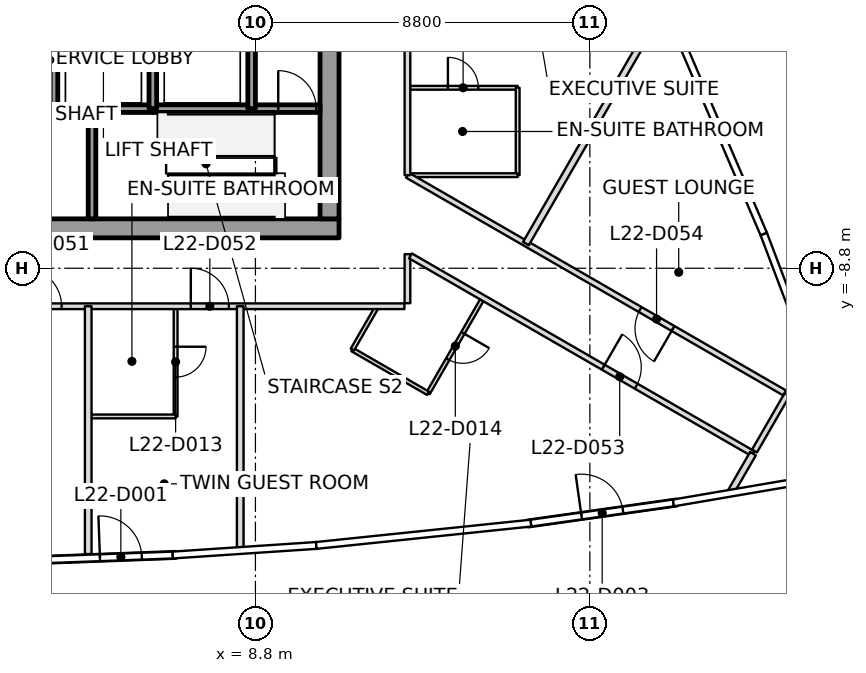
"""IFC4 building model, lengths in metres.
Left out: names, types, materials, properties, quantities, classifications, styles, units other than length and angle.
Written with IfcOpenShell. Run it as: python <this file> out.ifc"""

import sys

from ifc_helpers import new_model, si_unit, direction, frame, frame_2d, origin, place, context, subcontext, project, spatial, rectangle, extrude, element, fill, save


model = new_model("IFC4")
c1 = context("Model", 3, precision=1e-05, world=origin(), true_north=direction((0.0, 1.0)))
c2 = subcontext(c1, "Body", "Model", "MODEL_VIEW")
j1 = project(units=[si_unit("LENGTHUNIT", "METRE"), si_unit("PLANEANGLEUNIT", "RADIAN")], contexts=[c1])
p1 = place(None, origin())
s1 = spatial("IfcSite", under=j1, at=p1, CompositionType="ELEMENT")
p2 = place(p1, origin())
s2 = spatial("IfcBuilding", under=s1, at=p2, CompositionType="ELEMENT")
p3 = place(p2, frame((0.0, 0.0, 103.5)))
s3 = spatial("IfcBuildingStorey", under=s2, at=p3, CompositionType="ELEMENT", Elevation=103.5)
p4 = place(p3, frame((-11.0, -7.75, 0.0), z_axis=(0.0, 0.0, 1.0), x_axis=(1.0, 0.0, 0.0)))
e1 = element("IfcWall", 1, at=p4, inside=s3, PredefinedType="SHEAR", context=c2, shape_type="SweptSolid", body=[
    extrude(rectangle(XDim=22.0, YDim=0.5, at=frame_2d((11.0, 0.0))), origin(), (0.0, 0.0, 1.0), 3.7),
])
p5 = place(p4, frame((10.45, 0.0, 0.0)))
e2 = element("IfcOpeningElement", 2, at=p5, cuts=e1, PredefinedType="OPENING", context=c2, shape_type="SweptSolid", body=[
    extrude(rectangle(XDim=1.1, YDim=2.1, at=frame_2d((0.55, 1.05))), frame((0.0, 0.25, 0.0), z_axis=(0.0, -1.0, 0.0), x_axis=(1.0, 0.0, 0.0)), (0.0, 0.0, 1.0), 0.5),
])
p6 = place(p3, frame((10.75, -7.5, 0.0), z_axis=(0.0, 0.0, 1.0), x_axis=(0.0, 1.0, 0.0)))
e3 = element("IfcWall", 3, at=p6, inside=s3, PredefinedType="SHEAR", context=c2, shape_type="SweptSolid", body=[
    extrude(rectangle(XDim=15.0, YDim=0.5, at=frame_2d((7.5, 0.0))), origin(), (0.0, 0.0, 1.0), 3.7),
])
p7 = place(p6, frame((6.6, 0.0, 0.0)))
e4 = element("IfcOpeningElement", 4, at=p7, cuts=e3, PredefinedType="OPENING", context=c2, shape_type="SweptSolid", body=[
    extrude(rectangle(XDim=1.8, YDim=2.1, at=frame_2d((0.9, 1.05))), frame((0.0, 0.25, 0.0), z_axis=(0.0, -1.0, 0.0), x_axis=(1.0, 0.0, 0.0)), (0.0, 0.0, 1.0), 0.5),
])
p8 = place(p3, frame((2.75, -16.49, 0.0), z_axis=(0.0, 0.0, 1.0), x_axis=(0.999313230766, 0.037054916226, 0.0)))
e5 = element("IfcWall", 5, at=p8, inside=s3, PredefinedType="SOLIDWALL", context=c2, shape_type="SweptSolid", body=[
    extrude(rectangle(XDim=3.966, YDim=0.2, at=frame_2d((1.983, 0.0))), origin(), (0.0, 0.0, 1.0), 3.017),
])
p9 = place(p8, frame((1.96, 0.0, 0.0)))
e6 = element("IfcOpeningElement", 6, at=p9, cuts=e5, PredefinedType="OPENING", context=c2, shape_type="SweptSolid", body=[
    extrude(rectangle(XDim=1.1, YDim=2.1, at=frame_2d((0.55, 1.05))), frame((0.0, 0.1, 0.0), z_axis=(0.0, -1.0, 0.0), x_axis=(1.0, 0.0, 0.0)), (0.0, 0.0, 1.0), 0.2),
])
p10 = place(p3, frame((15.961, -15.52, 0.0), z_axis=(0.0, 0.0, 1.0), x_axis=(0.990119893165, 0.140223383067, 0.0)))
e7 = element("IfcWall", 7, at=p10, inside=s3, PredefinedType="SOLIDWALL", context=c2, shape_type="SweptSolid", body=[
    extrude(rectangle(XDim=3.966, YDim=0.2, at=frame_2d((1.983, 0.0))), origin(), (0.0, 0.0, 1.0), 3.04),
])
p11 = place(p10, frame((1.433, 0.0, 0.0)))
e8 = element("IfcOpeningElement", 8, at=p11, cuts=e7, PredefinedType="OPENING", context=c2, shape_type="SweptSolid", body=[
    extrude(rectangle(XDim=1.1, YDim=2.1, at=frame_2d((0.55, 1.05))), frame((0.0, 0.1, 0.0), z_axis=(0.0, -1.0, 0.0), x_axis=(1.0, 0.0, 0.0)), (0.0, 0.0, 1.0), 0.2),
])
p12 = place(p3, frame((3.5, -4.6, 0.0), z_axis=(0.0, 0.0, 1.0), x_axis=(-1.0, 0.0, 0.0)))
e9 = element("IfcWall", 9, at=p12, inside=s3, PredefinedType="SOLIDWALL", context=c2, shape_type="SweptSolid", body=[
    extrude(rectangle(XDim=2.6, YDim=0.2, at=frame_2d((1.3, 0.0))), origin(), (0.0, 0.0, 1.0), 3.55),
])
p13 = place(p3, frame((4.5, -4.6, 0.0), z_axis=(0.0, 0.0, 1.0), x_axis=(-1.0, 0.0, 0.0)))
e10 = element("IfcWall", 10, at=p13, inside=s3, PredefinedType="SOLIDWALL", context=c2, shape_type="SweptSolid", body=[
    extrude(rectangle(XDim=1.0, YDim=0.2, at=frame_2d((0.5, 0.0))), origin(), (0.0, 0.0, 1.0), 3.55),
])
p14 = place(p3, frame((3.5, -4.6, 0.0), z_axis=(0.0, 0.0, 1.0), x_axis=(0.0, 1.0, 0.0)))
e11 = element("IfcWall", 11, at=p14, inside=s3, PredefinedType="SOLIDWALL", context=c2, shape_type="SweptSolid", body=[
    extrude(rectangle(XDim=2.8, YDim=0.2, at=frame_2d((1.4, 0.0))), origin(), (0.0, 0.0, 1.0), 3.55),
])
p15 = place(p3, frame((4.5, -7.5, 0.0), z_axis=(0.0, 0.0, 1.0), x_axis=(0.0, 1.0, 0.0)))
e12 = element("IfcWall", 12, at=p15, inside=s3, PredefinedType="SOLIDWALL", context=c2, shape_type="SweptSolid", body=[
    extrude(rectangle(XDim=2.9, YDim=0.2, at=frame_2d((1.45, 0.0))), origin(), (0.0, 0.0, 1.0), 3.55),
])
p16 = place(p3, frame((4.5, -4.6, 0.0), z_axis=(0.0, 0.0, 1.0), x_axis=(1.0, 0.0, 0.0)))
e13 = element("IfcWall", 13, at=p16, inside=s3, PredefinedType="SOLIDWALL", context=c2, shape_type="SweptSolid", body=[
    extrude(rectangle(XDim=1.6, YDim=0.2, at=frame_2d((0.8, 0.0))), origin(), (0.0, 0.0, 1.0), 3.55),
])
p17 = place(p3, frame((6.1, -4.6, 0.0), z_axis=(0.0, 0.0, 1.0), x_axis=(1.0, 0.0, 0.0)))
e14 = element("IfcWall", 14, at=p17, inside=s3, PredefinedType="SOLIDWALL", context=c2, shape_type="SweptSolid", body=[
    extrude(rectangle(XDim=2.6, YDim=0.2, at=frame_2d((1.3, 0.0))), origin(), (0.0, 0.0, 1.0), 3.55),
])
p18 = place(p3, frame((6.1, -4.6, 0.0), z_axis=(0.0, 0.0, 1.0), x_axis=(0.0, 1.0, 0.0)))
e15 = element("IfcWall", 15, at=p18, inside=s3, PredefinedType="SOLIDWALL", context=c2, shape_type="SweptSolid", body=[
    extrude(rectangle(XDim=2.8, YDim=0.2, at=frame_2d((1.4, 0.0))), origin(), (0.0, 0.0, 1.0), 3.55),
])
p19 = place(p3, frame((8.7, -4.6, 0.0), z_axis=(0.0, 0.0, 1.0), x_axis=(1.0, 0.0, 0.0)))
e16 = element("IfcWall", 16, at=p19, inside=s3, PredefinedType="SOLIDWALL", context=c2, shape_type="SweptSolid", body=[
    extrude(rectangle(XDim=1.8, YDim=0.2, at=frame_2d((0.9, 0.0))), origin(), (0.0, 0.0, 1.0), 3.55),
])
p20 = place(p19, frame((0.7, 0.0, 0.0)))
e17 = element("IfcOpeningElement", 17, at=p20, cuts=e16, PredefinedType="OPENING", context=c2, shape_type="SweptSolid", body=[
    extrude(rectangle(XDim=1.0, YDim=2.1, at=frame_2d((0.5, 1.05))), frame((0.0, 0.1, 0.0), z_axis=(0.0, -1.0, 0.0), x_axis=(1.0, 0.0, 0.0)), (0.0, 0.0, 1.0), 0.2),
])
p21 = place(p3, frame((8.7, -1.8, 0.0), z_axis=(0.0, 0.0, 1.0), x_axis=(0.0, -1.0, 0.0)))
e18 = element("IfcWall", 18, at=p21, inside=s3, PredefinedType="SOLIDWALL", context=c2, shape_type="SweptSolid", body=[
    extrude(rectangle(XDim=2.8, YDim=0.2, at=frame_2d((1.4, 0.0))), origin(), (0.0, 0.0, 1.0), 3.55),
])
p22 = place(p3, frame((4.4, -9.8, 0.0), z_axis=(0.0, 0.0, 1.0), x_axis=(0.0, -1.0, 0.0)))
e19 = element("IfcWall", 19, at=p22, inside=s3, PredefinedType="PARTITIONING", context=c2, shape_type="SweptSolid", body=[
    extrude(rectangle(XDim=6.521, YDim=0.175, at=frame_2d((3.26, 0.0))), origin(), (0.0, 0.0, 1.0), 3.15),
])
p23 = place(p3, frame((8.4, -9.8, 0.0), z_axis=(0.0, 0.0, 1.0), x_axis=(0.0, -1.0, 0.0)))
e20 = element("IfcWall", 20, at=p23, inside=s3, PredefinedType="PARTITIONING", context=c2, shape_type="SweptSolid", body=[
    extrude(rectangle(XDim=6.441, YDim=0.175, at=frame_2d((3.221, 0.0))), origin(), (0.0, 0.0, 1.0), 3.15),
])
p24 = place(p3, frame((19.554, -1.853, 0.0), z_axis=(0.0, 0.0, 1.0), x_axis=(-0.500006290091, -0.866021772168, 0.0)))
e21 = element("IfcWall", 21, at=p24, inside=s3, PredefinedType="PARTITIONING", context=c2, shape_type="SweptSolid", body=[
    extrude(rectangle(XDim=7.272, YDim=0.175, at=frame_2d((3.636, 0.0))), origin(), (0.0, 0.0, 1.0), 2.947),
])
p25 = place(p3, frame((21.892, -13.679, 0.0), z_axis=(0.0, 0.0, 1.0), x_axis=(-0.499896243657, -0.866085299251, 0.0)))
e22 = element("IfcWall", 22, at=p25, inside=s3, PredefinedType="PARTITIONING", context=c2, shape_type="SweptSolid", body=[
    extrude(rectangle(XDim=1.216, YDim=0.175, at=frame_2d((0.608, 0.0))), origin(), (0.0, 0.0, 1.0), 3.15),
])
p26 = place(p3, frame((-12.72, -9.8, 0.0), z_axis=(0.0, 0.0, 1.0), x_axis=(1.0, 0.0, 0.0)))
e23 = element("IfcWall", 23, at=p26, inside=s3, PredefinedType="PARTITIONING", context=c2, shape_type="SweptSolid", body=[
    extrude(rectangle(XDim=25.44, YDim=0.15, at=frame_2d((12.72, 0.0))), origin(), (0.0, 0.0, 1.0), 3.017),
])
p27 = place(p26, frame((1.62, 0.0, 0.0)))
e24 = element("IfcOpeningElement", 24, at=p27, cuts=e23, PredefinedType="OPENING", context=c2, shape_type="SweptSolid", body=[
    extrude(rectangle(XDim=1.0, YDim=2.1, at=frame_2d((0.5, 1.05))), frame((0.0, 0.075, 0.0), z_axis=(0.0, -1.0, 0.0), x_axis=(1.0, 0.0, 0.0)), (0.0, 0.0, 1.0), 0.15),
])
p28 = place(p26, frame((7.22, 0.0, 0.0)))
e25 = element("IfcOpeningElement", 25, at=p28, cuts=e23, PredefinedType="OPENING", context=c2, shape_type="SweptSolid", body=[
    extrude(rectangle(XDim=1.0, YDim=2.1, at=frame_2d((0.5, 1.05))), frame((0.0, 0.075, 0.0), z_axis=(0.0, -1.0, 0.0), x_axis=(1.0, 0.0, 0.0)), (0.0, 0.0, 1.0), 0.15),
])
p29 = place(p26, frame((10.02, 0.0, 0.0)))
e26 = element("IfcOpeningElement", 26, at=p29, cuts=e23, PredefinedType="OPENING", context=c2, shape_type="SweptSolid", body=[
    extrude(rectangle(XDim=1.0, YDim=2.1, at=frame_2d((0.5, 1.05))), frame((0.0, 0.075, 0.0), z_axis=(0.0, -1.0, 0.0), x_axis=(1.0, 0.0, 0.0)), (0.0, 0.0, 1.0), 0.15),
])
p30 = place(p26, frame((15.42, 0.0, 0.0)))
e27 = element("IfcOpeningElement", 27, at=p30, cuts=e23, PredefinedType="OPENING", context=c2, shape_type="SweptSolid", body=[
    extrude(rectangle(XDim=1.0, YDim=2.1, at=frame_2d((0.5, 1.05))), frame((0.0, 0.075, 0.0), z_axis=(0.0, -1.0, 0.0), x_axis=(1.0, 0.0, 0.0)), (0.0, 0.0, 1.0), 0.15),
])
p31 = place(p26, frame((19.82, 0.0, 0.0)))
e28 = element("IfcOpeningElement", 28, at=p31, cuts=e23, PredefinedType="OPENING", context=c2, shape_type="SweptSolid", body=[
    extrude(rectangle(XDim=1.0, YDim=2.1, at=frame_2d((0.5, 1.05))), frame((0.0, 0.075, 0.0), z_axis=(0.0, -1.0, 0.0), x_axis=(1.0, 0.0, 0.0)), (0.0, 0.0, 1.0), 0.15),
])
p32 = place(p3, frame((12.8, -9.72, 0.0), z_axis=(0.0, 0.0, 1.0), x_axis=(0.0, 1.0, 0.0)))
e29 = element("IfcWall", 29, at=p32, inside=s3, PredefinedType="PARTITIONING", context=c2, shape_type="SweptSolid", body=[
    extrude(rectangle(XDim=1.291, YDim=0.15, at=frame_2d((0.646, 0.0))), origin(), (0.0, 0.0, 1.0), 2.797),
])
p33 = place(p3, frame((12.879, -8.475, 0.0), z_axis=(0.0, 0.0, 1.0), x_axis=(0.866019944116, -0.500009456303, 0.0)))
e30 = element("IfcWall", 30, at=p33, inside=s3, PredefinedType="PARTITIONING", context=c2, shape_type="SweptSolid", body=[
    extrude(rectangle(XDim=10.407, YDim=0.15, at=frame_2d((5.204, 0.0))), origin(), (0.0, 0.0, 1.0), 2.797),
])
p34 = place(p33, frame((5.858, 0.0, 0.0)))
e31 = element("IfcOpeningElement", 31, at=p34, cuts=e30, PredefinedType="OPENING", context=c2, shape_type="SweptSolid", body=[
    extrude(rectangle(XDim=1.0, YDim=2.1, at=frame_2d((0.5, 1.05))), frame((0.0, 0.075, 0.0), z_axis=(0.0, -1.0, 0.0), x_axis=(1.0, 0.0, 0.0)), (0.0, 0.0, 1.0), 0.15),
])
p35 = place(p3, frame((21.932, -13.609, 0.0), z_axis=(0.0, 0.0, 1.0), x_axis=(0.500062383118, 0.865989383878, 0.0)))
e32 = element("IfcWall", 32, at=p35, inside=s3, PredefinedType="PARTITIONING", context=c2, shape_type="SweptSolid", body=[
    extrude(rectangle(XDim=1.72, YDim=0.15, at=frame_2d((0.86, 0.0))), origin(), (0.0, 0.0, 1.0), 2.797),
])
p36 = place(p3, frame((22.723, -12.08, 0.0), z_axis=(0.0, 0.0, 1.0), x_axis=(-0.866023783073, 0.500002807145, 0.0)))
e33 = element("IfcWall", 33, at=p36, inside=s3, PredefinedType="PARTITIONING", context=c2, shape_type="SweptSolid", body=[
    extrude(rectangle(XDim=11.458, YDim=0.15, at=frame_2d((5.729, 0.0))), origin(), (0.0, 0.0, 1.0), 2.947),
])
p37 = place(p36, frame((3.389, 0.0, 0.0)))
e34 = element("IfcOpeningElement", 34, at=p37, cuts=e33, PredefinedType="OPENING", context=c2, shape_type="SweptSolid", body=[
    extrude(rectangle(XDim=1.0, YDim=2.1, at=frame_2d((0.5, 1.05))), frame((0.0, 0.075, 0.0), z_axis=(0.0, -1.0, 0.0), x_axis=(1.0, 0.0, 0.0)), (0.0, 0.0, 1.0), 0.15),
])
p38 = place(p3, frame((12.8, -6.351, 0.0), z_axis=(0.0, 0.0, 1.0), x_axis=(0.0, 1.0, 0.0)))
e35 = element("IfcWall", 35, at=p38, inside=s3, PredefinedType="PARTITIONING", context=c2, shape_type="SweptSolid", body=[
    extrude(rectangle(XDim=16.071, YDim=0.15, at=frame_2d((8.035, 0.0))), origin(), (0.0, 0.0, 1.0), 2.947),
])
p39 = place(p38, frame((14.451, 0.0, 0.0)))
e36 = element("IfcOpeningElement", 36, at=p39, cuts=e35, PredefinedType="OPENING", context=c2, shape_type="SweptSolid", body=[
    extrude(rectangle(XDim=1.0, YDim=2.1, at=frame_2d((0.5, 1.05))), frame((0.0, 0.075, 0.0), z_axis=(0.0, -1.0, 0.0), x_axis=(1.0, 0.0, 0.0)), (0.0, 0.0, 1.0), 0.15),
])
p40 = place(p38, frame((6.375, 0.0, 0.0)))
e37 = element("IfcOpeningElement", 37, at=p40, cuts=e35, PredefinedType="OPENING", context=c2, shape_type="SweptSolid", body=[
    extrude(rectangle(XDim=1.0, YDim=2.1, at=frame_2d((0.5, 1.05))), frame((0.0, 0.075, 0.0), z_axis=(0.0, -1.0, 0.0), x_axis=(1.0, 0.0, 0.0)), (0.0, 0.0, 1.0), 0.15),
])
p41 = place(p3, frame((6.7, -9.83, 0.0), z_axis=(0.0, 0.0, 1.0), x_axis=(0.0, -1.0, 0.0)))
e38 = element("IfcWall", 38, at=p41, inside=s3, PredefinedType="PARTITIONING", context=c2, shape_type="SweptSolid", body=[
    extrude(rectangle(XDim=2.87, YDim=0.1, at=frame_2d((1.435, 0.0))), origin(), (0.0, 0.0, 1.0), 3.15),
])
p42 = place(p41, frame((1.035, 0.0, 0.0)))
e39 = element("IfcOpeningElement", 39, at=p42, cuts=e38, PredefinedType="OPENING", context=c2, shape_type="SweptSolid", body=[
    extrude(rectangle(XDim=0.8, YDim=2.1, at=frame_2d((0.4, 1.05))), frame((0.0, 0.05, 0.0), z_axis=(0.0, -1.0, 0.0), x_axis=(1.0, 0.0, 0.0)), (0.0, 0.0, 1.0), 0.1),
])
p43 = place(p3, frame((6.7, -12.7, 0.0), z_axis=(0.0, 0.0, 1.0), x_axis=(-1.0, 0.0, 0.0)))
e40 = element("IfcWall", 40, at=p43, inside=s3, PredefinedType="PARTITIONING", context=c2, shape_type="SweptSolid", body=[
    extrude(rectangle(XDim=2.27, YDim=0.1, at=frame_2d((1.135, 0.0))), origin(), (0.0, 0.0, 1.0), 3.017),
])
p44 = place(p3, frame((14.777, -9.605, 0.0), z_axis=(0.0, 0.0, 1.0), x_axis=(-0.499999802827, -0.866025517622, 0.0)))
e41 = element("IfcWall", 41, at=p44, inside=s3, PredefinedType="PARTITIONING", context=c2, shape_type="SweptSolid", body=[
    extrude(rectangle(XDim=2.87, YDim=0.1, at=frame_2d((1.435, 0.0))), origin(), (0.0, 0.0, 1.0), 2.797),
])
p45 = place(p44, frame((1.035, 0.0, 0.0)))
e42 = element("IfcOpeningElement", 42, at=p45, cuts=e41, PredefinedType="OPENING", context=c2, shape_type="SweptSolid", body=[
    extrude(rectangle(XDim=0.8, YDim=2.1, at=frame_2d((0.4, 1.05))), frame((0.0, 0.05, 0.0), z_axis=(0.0, -1.0, 0.0), x_axis=(1.0, 0.0, 0.0)), (0.0, 0.0, 1.0), 0.1),
])
p46 = place(p3, frame((13.342, -12.091, 0.0), z_axis=(0.0, 0.0, 1.0), x_axis=(-0.86602648383, 0.499998129301, 0.0)))
e43 = element("IfcWall", 43, at=p46, inside=s3, PredefinedType="PARTITIONING", context=c2, shape_type="SweptSolid", body=[
    extrude(rectangle(XDim=2.3, YDim=0.1, at=frame_2d((1.15, 0.0))), origin(), (0.0, 0.0, 1.0), 3.15),
])
p47 = place(p3, frame((11.35, -10.941, 0.0), z_axis=(0.0, 0.0, 1.0), x_axis=(0.499865263774, 0.866103179807, 0.0)))
e44 = element("IfcWall", 44, at=p47, inside=s3, PredefinedType="PARTITIONING", context=c2, shape_type="SweptSolid", body=[
    extrude(rectangle(XDim=1.282, YDim=0.1, at=frame_2d((0.641, 0.0))), origin(), (0.0, 0.0, 1.0), 3.15),
])
p48 = place(p3, frame((12.83, -4.051, 0.0), z_axis=(0.0, 0.0, 1.0), x_axis=(1.0, 0.0, 0.0)))
e45 = element("IfcWall", 45, at=p48, inside=s3, PredefinedType="PARTITIONING", context=c2, shape_type="SweptSolid", body=[
    extrude(rectangle(XDim=2.87, YDim=0.1, at=frame_2d((1.435, 0.0))), origin(), (0.0, 0.0, 1.0), 2.947),
])
p49 = place(p48, frame((1.035, 0.0, 0.0)))
e46 = element("IfcOpeningElement", 46, at=p49, cuts=e45, PredefinedType="OPENING", context=c2, shape_type="SweptSolid", body=[
    extrude(rectangle(XDim=0.8, YDim=2.1, at=frame_2d((0.4, 1.05))), frame((0.0, 0.05, 0.0), z_axis=(0.0, -1.0, 0.0), x_axis=(1.0, 0.0, 0.0)), (0.0, 0.0, 1.0), 0.1),
])
p50 = place(p3, frame((15.7, -4.051, 0.0), z_axis=(0.0, 0.0, 1.0), x_axis=(0.0, -1.0, 0.0)))
e47 = element("IfcWall", 47, at=p50, inside=s3, PredefinedType="PARTITIONING", context=c2, shape_type="SweptSolid", body=[
    extrude(rectangle(XDim=2.3, YDim=0.1, at=frame_2d((1.15, 0.0))), origin(), (0.0, 0.0, 1.0), 3.15),
])
p51 = place(p3, frame((15.7, -6.351, 0.0), z_axis=(0.0, 0.0, 1.0), x_axis=(-1.0, 0.0, 0.0)))
e48 = element("IfcWall", 48, at=p51, inside=s3, PredefinedType="PARTITIONING", context=c2, shape_type="SweptSolid", body=[
    extrude(rectangle(XDim=2.84, YDim=0.1, at=frame_2d((1.42, 0.0))), origin(), (0.0, 0.0, 1.0), 3.15),
])
p52 = place(p9, origin())
e49 = element("IfcDoor", 49, at=p52, inside=s3, OperationType="SINGLE_SWING_RIGHT", PredefinedType="DOOR", context=c2, shape_type="SweptSolid", body=[
    extrude(rectangle(XDim=1.1, YDim=2.1, at=frame_2d((0.55, 1.05))), frame((0.0, 0.025, 0.0), z_axis=(0.0, -1.0, 0.0), x_axis=(1.0, 0.0, 0.0)), (0.0, 0.0, 1.0), 0.05),
])
fill(e6, e49)
p53 = place(p11, origin())
e50 = element("IfcDoor", 50, at=p53, inside=s3, OperationType="SINGLE_SWING_RIGHT", PredefinedType="DOOR", context=c2, shape_type="SweptSolid", body=[
    extrude(rectangle(XDim=1.1, YDim=2.1, at=frame_2d((0.55, 1.05))), frame((0.0, 0.025, 0.0), z_axis=(0.0, -1.0, 0.0), x_axis=(1.0, 0.0, 0.0)), (0.0, 0.0, 1.0), 0.05),
])
fill(e8, e50)
p54 = place(p30, origin())
e51 = element("IfcDoor", 51, at=p54, inside=s3, OperationType="SINGLE_SWING_LEFT", PredefinedType="DOOR", context=c2, shape_type="SweptSolid", body=[
    extrude(rectangle(XDim=1.0, YDim=2.1, at=frame_2d((0.5, 1.05))), frame((0.0, 0.025, 0.0), z_axis=(0.0, -1.0, 0.0), x_axis=(1.0, 0.0, 0.0)), (0.0, 0.0, 1.0), 0.05),
])
fill(e27, e51)
p55 = place(p31, origin())
e52 = element("IfcDoor", 52, at=p55, inside=s3, OperationType="SINGLE_SWING_LEFT", PredefinedType="DOOR", context=c2, shape_type="SweptSolid", body=[
    extrude(rectangle(XDim=1.0, YDim=2.1, at=frame_2d((0.5, 1.05))), frame((0.0, 0.025, 0.0), z_axis=(0.0, -1.0, 0.0), x_axis=(1.0, 0.0, 0.0)), (0.0, 0.0, 1.0), 0.05),
])
fill(e28, e52)
p56 = place(p42, origin())
e53 = element("IfcDoor", 53, at=p56, inside=s3, OperationType="SINGLE_SWING_RIGHT", PredefinedType="DOOR", context=c2, shape_type="SweptSolid", body=[
    extrude(rectangle(XDim=0.8, YDim=2.1, at=frame_2d((0.4, 1.05))), frame((0.0, 0.025, 0.0), z_axis=(0.0, -1.0, 0.0), x_axis=(1.0, 0.0, 0.0)), (0.0, 0.0, 1.0), 0.05),
])
fill(e39, e53)
p57 = place(p34, origin())
e54 = element("IfcDoor", 54, at=p57, inside=s3, OperationType="SINGLE_SWING_LEFT", PredefinedType="DOOR", context=c2, shape_type="SweptSolid", body=[
    extrude(rectangle(XDim=1.0, YDim=2.1, at=frame_2d((0.5, 1.05))), frame((0.0, 0.025, 0.0), z_axis=(0.0, -1.0, 0.0), x_axis=(1.0, 0.0, 0.0)), (0.0, 0.0, 1.0), 0.05),
])
fill(e31, e54)
p58 = place(p45, origin())
e55 = element("IfcDoor", 55, at=p58, inside=s3, OperationType="SINGLE_SWING_RIGHT", PredefinedType="DOOR", context=c2, shape_type="SweptSolid", body=[
    extrude(rectangle(XDim=0.8, YDim=2.1, at=frame_2d((0.4, 1.05))), frame((0.0, 0.025, 0.0), z_axis=(0.0, -1.0, 0.0), x_axis=(1.0, 0.0, 0.0)), (0.0, 0.0, 1.0), 0.05),
])
fill(e42, e55)
p59 = place(p37, origin())
e56 = element("IfcDoor", 56, at=p59, inside=s3, OperationType="SINGLE_SWING_LEFT", PredefinedType="DOOR", context=c2, shape_type="SweptSolid", body=[
    extrude(rectangle(XDim=1.0, YDim=2.1, at=frame_2d((0.5, 1.05))), frame((0.0, 0.025, 0.0), z_axis=(0.0, -1.0, 0.0), x_axis=(1.0, 0.0, 0.0)), (0.0, 0.0, 1.0), 0.05),
])
fill(e34, e56)
p60 = place(p49, origin())
e57 = element("IfcDoor", 57, at=p60, inside=s3, OperationType="SINGLE_SWING_LEFT", PredefinedType="DOOR", context=c2, shape_type="SweptSolid", body=[
    extrude(rectangle(XDim=0.8, YDim=2.1, at=frame_2d((0.4, 1.05))), frame((0.0, 0.025, 0.0), z_axis=(0.0, -1.0, 0.0), x_axis=(1.0, 0.0, 0.0)), (0.0, 0.0, 1.0), 0.05),
])
fill(e46, e57)
p61 = place(p20, origin())
e58 = element("IfcDoor", 58, at=p61, inside=s3, OperationType="SINGLE_SWING_RIGHT", PredefinedType="DOOR", context=c2, shape_type="SweptSolid", body=[
    extrude(rectangle(XDim=1.0, YDim=2.1, at=frame_2d((0.5, 1.05))), frame((0.0, 0.025, 0.0), z_axis=(0.0, -1.0, 0.0), x_axis=(1.0, 0.0, 0.0)), (0.0, 0.0, 1.0), 0.05),
])
fill(e17, e58)
save(model, sys.argv[1])
